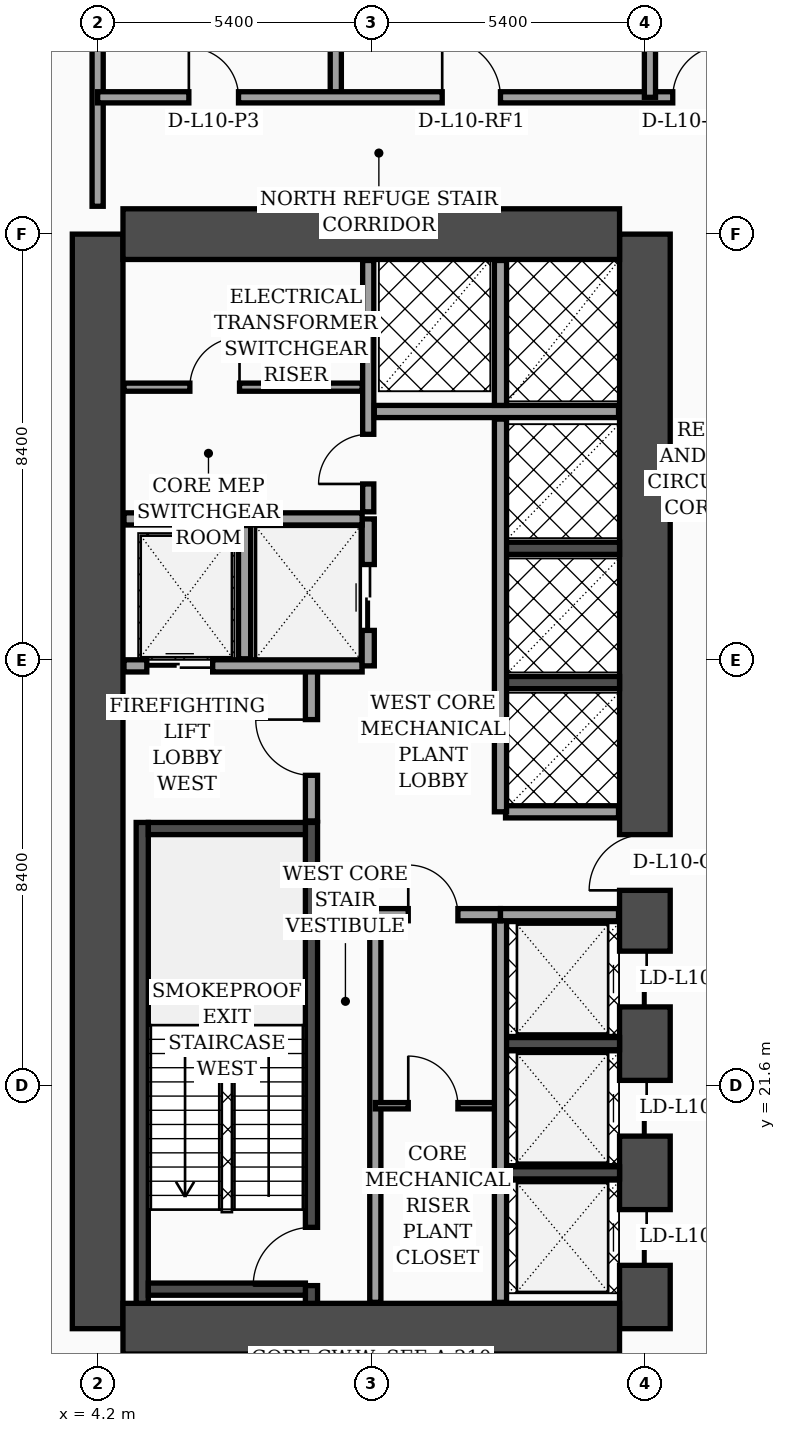
"""IFC4 building model, lengths in metres.
Left out: names, types, materials, properties, quantities, classifications, styles, units other than length and angle.
Written with IfcOpenShell. Run it as: python <this file> out.ifc"""

import sys

from ifc_helpers import new_model, si_unit, direction, frame, frame_2d, origin, place, context, subcontext, project, spatial, rectangle, extrude, element, fill, save


model = new_model("IFC4")
c1 = context("Model", 3, precision=1e-05, world=origin(), true_north=direction((0.0, 1.0)))
c2 = subcontext(c1, "Body", "Model", "MODEL_VIEW")
j1 = project(units=[si_unit("LENGTHUNIT", "METRE"), si_unit("PLANEANGLEUNIT", "RADIAN")], contexts=[c1])
p1 = place(None, origin())
s1 = spatial("IfcSite", under=j1, at=p1, CompositionType="ELEMENT")
p2 = place(p1, origin())
s2 = spatial("IfcBuilding", under=s1, at=p2, CompositionType="ELEMENT")
p3 = place(p2, frame((0.0, 0.0, 46.0)))
s3 = spatial("IfcBuildingStorey", under=s2, at=p3, CompositionType="ELEMENT", Elevation=46.0)
p4 = place(p3, frame((4.2, 16.8, 0.0), z_axis=(0.0, 0.0, 1.0), x_axis=(0.0, 1.0, 0.0)))
e1 = element("IfcWall", 1, at=p4, inside=s3, PredefinedType="SHEAR", context=c2, shape_type="SweptSolid", body=[
    extrude(rectangle(XDim=21.6, YDim=1.0, at=frame_2d((10.8, 0.0))), origin(), (0.0, 0.0, 1.0), 4.56),
])
p5 = place(p3, frame((15.0, 16.8, 0.0), z_axis=(0.0, 0.0, 1.0), x_axis=(0.0, 1.0, 0.0)))
e2 = element("IfcWall", 2, at=p5, inside=s3, PredefinedType="SHEAR", context=c2, shape_type="SweptSolid", body=[
    extrude(rectangle(XDim=21.6, YDim=1.0, at=frame_2d((10.8, 0.0))), origin(), (0.0, 0.0, 1.0), 4.56),
])
p6 = place(p5, frame((8.65, 0.0, 0.0)))
e3 = element("IfcOpeningElement", 3, at=p6, cuts=e2, PredefinedType="OPENING", context=c2, shape_type="SweptSolid", body=[
    extrude(rectangle(XDim=1.1, YDim=2.2, at=frame_2d((0.55, 1.1))), frame((0.0, 0.51, 0.0), z_axis=(0.0, -1.0, 0.0), x_axis=(1.0, 0.0, 0.0)), (0.0, 0.0, 1.0), 1.02),
])
p7 = place(p5, frame((1.25, 0.0, 0.0)))
e4 = element("IfcOpeningElement", 4, at=p7, cuts=e2, PredefinedType="OPENING", context=c2, shape_type="SweptSolid", body=[
    extrude(rectangle(XDim=1.1, YDim=2.2, at=frame_2d((0.55, 1.1))), frame((0.0, 0.51, 0.0), z_axis=(0.0, -1.0, 0.0), x_axis=(1.0, 0.0, 0.0)), (0.0, 0.0, 1.0), 1.02),
])
p8 = place(p5, frame((3.8, 0.0, 0.0)))
e5 = element("IfcOpeningElement", 5, at=p8, cuts=e2, PredefinedType="OPENING", context=c2, shape_type="SweptSolid", body=[
    extrude(rectangle(XDim=1.1, YDim=2.2, at=frame_2d((0.55, 1.1))), frame((0.0, 0.51, 0.0), z_axis=(0.0, -1.0, 0.0), x_axis=(1.0, 0.0, 0.0)), (0.0, 0.0, 1.0), 1.02),
])
p9 = place(p5, frame((6.35, 0.0, 0.0)))
e6 = element("IfcOpeningElement", 6, at=p9, cuts=e2, PredefinedType="OPENING", context=c2, shape_type="SweptSolid", body=[
    extrude(rectangle(XDim=1.1, YDim=2.2, at=frame_2d((0.55, 1.1))), frame((0.0, 0.51, 0.0), z_axis=(0.0, -1.0, 0.0), x_axis=(1.0, 0.0, 0.0)), (0.0, 0.0, 1.0), 1.02),
])
for number, where, z_axis, x_axis in (
    (7, (4.7, 38.4, 0.0), (0.0, 0.0, 1.0), (1.0, 0.0, 0.0)),
    (8, (4.7, 16.8, 0.0), (0.0, 0.0, 1.0), (1.0, 0.0, 0.0)),
):
    element("IfcWall", number, at=place(p3, frame(where, z_axis=z_axis, x_axis=x_axis)), inside=s3, PredefinedType="SHEAR", context=c2, shape_type="SweptSolid", body=[
        extrude(rectangle(XDim=9.8, YDim=1.0, at=frame_2d((4.9, 0.0))), origin(), (0.0, 0.0, 1.0), 4.56),
    ])
p10 = place(p3, frame((5.08, 17.3, 0.0), z_axis=(0.0, 0.0, 1.0), x_axis=(0.0, 1.0, 0.0)))
e9 = element("IfcWall", 9, at=p10, inside=s3, PredefinedType="SOLIDWALL", context=c2, shape_type="SweptSolid", body=[
    extrude(rectangle(XDim=9.49, YDim=0.24, at=frame_2d((4.745, 0.0))), origin(), (0.0, 0.0, 1.0), 4.56),
])
p11 = place(p3, frame((8.42, 17.3, 0.0), z_axis=(0.0, 0.0, 1.0), x_axis=(0.0, 1.0, 0.0)))
e10 = element("IfcWall", 10, at=p11, inside=s3, PredefinedType="SOLIDWALL", context=c2, shape_type="SweptSolid", body=[
    extrude(rectangle(XDim=9.49, YDim=0.24, at=frame_2d((4.745, 0.0))), origin(), (0.0, 0.0, 1.0), 4.56),
])
p12 = place(p11, frame((0.35, 0.0, 0.0)))
e11 = element("IfcOpeningElement", 11, at=p12, cuts=e10, PredefinedType="OPENING", context=c2, shape_type="SweptSolid", body=[
    extrude(rectangle(XDim=1.15, YDim=2.2, at=frame_2d((0.575, 1.1))), frame((0.0, 0.13, 0.0), z_axis=(0.0, -1.0, 0.0), x_axis=(1.0, 0.0, 0.0)), (0.0, 0.0, 1.0), 0.26),
])
for number, where, z_axis, x_axis in (
    (12, (5.2, 17.58, 0.0), (0.0, 0.0, 1.0), (1.0, 0.0, 0.0)),
    (13, (5.2, 26.67, 0.0), (0.0, 0.0, 1.0), (1.0, 0.0, 0.0)),
):
    element("IfcWall", number, at=place(p3, frame(where, z_axis=z_axis, x_axis=x_axis)), inside=s3, PredefinedType="SOLIDWALL", context=c2, shape_type="SweptSolid", body=[
        extrude(rectangle(XDim=3.1, YDim=0.24, at=frame_2d((1.55, 0.0))), origin(), (0.0, 0.0, 1.0), 4.56),
    ])
for number, where, z_axis, x_axis in (
    (14, (12.18, 19.875, 0.0), (0.0, 0.0, 1.0), (1.0, 0.0, 0.0)),
    (15, (12.18, 22.425, 0.0), (0.0, 0.0, 1.0), (1.0, 0.0, 0.0)),
    (16, (12.18, 29.55, 0.0), (0.0, 0.0, 1.0), (1.0, 0.0, 0.0)),
    (17, (12.18, 32.2, 0.0), (0.0, 0.0, 1.0), (1.0, 0.0, 0.0)),
):
    element("IfcWall", number, at=place(p3, frame(where, z_axis=z_axis, x_axis=x_axis)), inside=s3, PredefinedType="SOLIDWALL", context=c2, shape_type="SweptSolid", body=[
        extrude(rectangle(XDim=2.32, YDim=0.24, at=frame_2d((1.16, 0.0))), origin(), (0.0, 0.0, 1.0), 4.56),
    ])
p13 = place(p3, frame((8.42, 26.82, 0.0), z_axis=(0.0, 0.0, 1.0), x_axis=(0.0, 1.0, 0.0)))
e18 = element("IfcWall", 18, at=p13, inside=s3, PredefinedType="SOLIDWALL", context=c2, shape_type="SweptSolid", body=[
    extrude(rectangle(XDim=3.0, YDim=0.24, at=frame_2d((1.5, 0.0))), origin(), (0.0, 0.0, 1.0), 4.56),
])
p14 = place(p13, frame((0.9, 0.0, 0.0)))
e19 = element("IfcOpeningElement", 19, at=p14, cuts=e18, PredefinedType="OPENING", context=c2, shape_type="SweptSolid", body=[
    extrude(rectangle(XDim=1.1, YDim=2.2, at=frame_2d((0.55, 1.1))), frame((0.0, 0.13, 0.0), z_axis=(0.0, -1.0, 0.0), x_axis=(1.0, 0.0, 0.0)), (0.0, 0.0, 1.0), 0.26),
])
p15 = place(p3, frame((4.72, 29.88, 0.0), z_axis=(0.0, 0.0, 1.0), x_axis=(1.0, 0.0, 0.0)))
e20 = element("IfcWall", 20, at=p15, inside=s3, PredefinedType="SOLIDWALL", context=c2, shape_type="SweptSolid", body=[
    extrude(rectangle(XDim=4.7, YDim=0.24, at=frame_2d((2.35, 0.0))), origin(), (0.0, 0.0, 1.0), 4.56),
])
p16 = place(p15, frame((0.45, 0.0, 0.0)))
e21 = element("IfcOpeningElement", 21, at=p16, cuts=e20, PredefinedType="OPENING", context=c2, shape_type="SweptSolid", body=[
    extrude(rectangle(XDim=1.3, YDim=2.35, at=frame_2d((0.65, 1.175))), frame((0.0, 0.13, 0.0), z_axis=(0.0, -1.0, 0.0), x_axis=(1.0, 0.0, 0.0)), (0.0, 0.0, 1.0), 0.26),
])
p17 = place(p3, frame((7.1, 30.02, 0.0), z_axis=(0.0, 0.0, 1.0), x_axis=(0.0, 1.0, 0.0)))
e22 = element("IfcWall", 22, at=p17, inside=s3, PredefinedType="SOLIDWALL", context=c2, shape_type="SweptSolid", body=[
    extrude(rectangle(XDim=2.63, YDim=0.24, at=frame_2d((1.315, 0.0))), origin(), (0.0, 0.0, 1.0), 4.56),
])
p18 = place(p3, frame((9.54, 29.88, 0.0), z_axis=(0.0, 0.0, 1.0), x_axis=(0.0, 1.0, 0.0)))
e23 = element("IfcWall", 23, at=p18, inside=s3, PredefinedType="SOLIDWALL", context=c2, shape_type="SweptSolid", body=[
    extrude(rectangle(XDim=2.9, YDim=0.24, at=frame_2d((1.45, 0.0))), origin(), (0.0, 0.0, 1.0), 4.56),
])
p19 = place(p18, frame((0.7, 0.0, 0.0)))
e24 = element("IfcOpeningElement", 24, at=p19, cuts=e23, PredefinedType="OPENING", context=c2, shape_type="SweptSolid", body=[
    extrude(rectangle(XDim=1.3, YDim=2.35, at=frame_2d((0.65, 1.175))), frame((0.0, 0.13, 0.0), z_axis=(0.0, -1.0, 0.0), x_axis=(1.0, 0.0, 0.0)), (0.0, 0.0, 1.0), 0.26),
])
p20 = place(p3, frame((4.72, 32.78, 0.0), z_axis=(0.0, 0.0, 1.0), x_axis=(1.0, 0.0, 0.0)))
e25 = element("IfcWall", 25, at=p20, inside=s3, PredefinedType="SOLIDWALL", context=c2, shape_type="SweptSolid", body=[
    extrude(rectangle(XDim=4.7, YDim=0.24, at=frame_2d((2.35, 0.0))), origin(), (0.0, 0.0, 1.0), 4.56),
])
p21 = place(p3, frame((9.68, 17.32, 0.0), z_axis=(0.0, 0.0, 1.0), x_axis=(0.0, 1.0, 0.0)))
e26 = element("IfcWall", 26, at=p21, inside=s3, PredefinedType="SOLIDWALL", context=c2, shape_type="SweptSolid", body=[
    extrude(rectangle(XDim=7.68, YDim=0.22, at=frame_2d((3.84, 0.0))), origin(), (0.0, 0.0, 1.0), 4.56),
])
p22 = place(p3, frame((4.72, 35.38, 0.0), z_axis=(0.0, 0.0, 1.0), x_axis=(1.0, 0.0, 0.0)))
e27 = element("IfcWall", 27, at=p22, inside=s3, PredefinedType="PARTITIONING", context=c2, shape_type="SweptSolid", body=[
    extrude(rectangle(XDim=4.7, YDim=0.16, at=frame_2d((2.35, 0.0))), origin(), (0.0, 0.0, 1.0), 4.56),
])
p23 = place(p22, frame((1.3, 0.0, 0.0)))
e28 = element("IfcOpeningElement", 28, at=p23, cuts=e27, PredefinedType="OPENING", context=c2, shape_type="SweptSolid", body=[
    extrude(rectangle(XDim=0.98, YDim=2.15, at=frame_2d((0.49, 1.075))), frame((0.0, 0.09, 0.0), z_axis=(0.0, -1.0, 0.0), x_axis=(1.0, 0.0, 0.0)), (0.0, 0.0, 1.0), 0.18),
])
p24 = place(p3, frame((9.54, 32.92, 0.0), z_axis=(0.0, 0.0, 1.0), x_axis=(0.0, 1.0, 0.0)))
e29 = element("IfcWall", 29, at=p24, inside=s3, PredefinedType="SOLIDWALL", context=c2, shape_type="SweptSolid", body=[
    extrude(rectangle(XDim=4.96, YDim=0.22, at=frame_2d((2.48, 0.0))), origin(), (0.0, 0.0, 1.0), 4.56),
])
p25 = place(p24, frame((0.55, 0.0, 0.0)))
e30 = element("IfcOpeningElement", 30, at=p25, cuts=e29, PredefinedType="OPENING", context=c2, shape_type="SweptSolid", body=[
    extrude(rectangle(XDim=0.98, YDim=2.15, at=frame_2d((0.49, 1.075))), frame((0.0, 0.12, 0.0), z_axis=(0.0, -1.0, 0.0), x_axis=(1.0, 0.0, 0.0)), (0.0, 0.0, 1.0), 0.24),
])
p26 = place(p3, frame((9.68, 21.2, 0.0), z_axis=(0.0, 0.0, 1.0), x_axis=(1.0, 0.0, 0.0)))
e31 = element("IfcWall", 31, at=p26, inside=s3, PredefinedType="PARTITIONING", context=c2, shape_type="SweptSolid", body=[
    extrude(rectangle(XDim=2.47, YDim=0.125, at=frame_2d((1.235, 0.0))), origin(), (0.0, 0.0, 1.0), 4.56),
])
p27 = place(p26, frame((0.65, 0.0, 0.0)))
e32 = element("IfcOpeningElement", 32, at=p27, cuts=e31, PredefinedType="OPENING", context=c2, shape_type="SweptSolid", body=[
    extrude(rectangle(XDim=0.98, YDim=2.15, at=frame_2d((0.49, 1.075))), frame((0.0, 0.073, 0.0), z_axis=(0.0, -1.0, 0.0), x_axis=(1.0, 0.0, 0.0)), (0.0, 0.0, 1.0), 0.145),
])
p28 = place(p3, frame((12.15, 17.32, 0.0), z_axis=(0.0, 0.0, 1.0), x_axis=(0.0, 1.0, 0.0)))
e33 = element("IfcWall", 33, at=p28, inside=s3, PredefinedType="SOLIDWALL", context=c2, shape_type="SweptSolid", body=[
    extrude(rectangle(XDim=7.65, YDim=0.24, at=frame_2d((3.825, 0.0))), origin(), (0.0, 0.0, 1.0), 4.56),
])
p29 = place(p3, frame((9.68, 24.97, 0.0), z_axis=(0.0, 0.0, 1.0), x_axis=(1.0, 0.0, 0.0)))
e34 = element("IfcWall", 34, at=p29, inside=s3, PredefinedType="SOLIDWALL", context=c2, shape_type="SweptSolid", body=[
    extrude(rectangle(XDim=2.47, YDim=0.24, at=frame_2d((1.235, 0.0))), origin(), (0.0, 0.0, 1.0), 4.56),
])
p30 = place(p29, frame((0.65, 0.0, 0.0)))
e35 = element("IfcOpeningElement", 35, at=p30, cuts=e34, PredefinedType="OPENING", context=c2, shape_type="SweptSolid", body=[
    extrude(rectangle(XDim=0.98, YDim=2.15, at=frame_2d((0.49, 1.075))), frame((0.0, 0.13, 0.0), z_axis=(0.0, -1.0, 0.0), x_axis=(1.0, 0.0, 0.0)), (0.0, 0.0, 1.0), 0.26),
])
p31 = place(p3, frame((12.15, 24.97, 0.0), z_axis=(0.0, 0.0, 1.0), x_axis=(1.0, 0.0, 0.0)))
e36 = element("IfcWall", 36, at=p31, inside=s3, PredefinedType="SOLIDWALL", context=c2, shape_type="SweptSolid", body=[
    extrude(rectangle(XDim=2.33, YDim=0.24, at=frame_2d((1.165, 0.0))), origin(), (0.0, 0.0, 1.0), 3.84),
])
p32 = place(p3, frame((12.25, 27.0, 0.0), z_axis=(0.0, 0.0, 1.0), x_axis=(1.0, 0.0, 0.0)))
e37 = element("IfcWall", 37, at=p32, inside=s3, PredefinedType="SOLIDWALL", context=c2, shape_type="SweptSolid", body=[
    extrude(rectangle(XDim=2.23, YDim=0.24, at=frame_2d((1.115, 0.0))), origin(), (0.0, 0.0, 1.0), 4.56),
])
p33 = place(p3, frame((12.15, 27.0, 0.0), z_axis=(0.0, 0.0, 1.0), x_axis=(0.0, 1.0, 0.0)))
e38 = element("IfcWall", 38, at=p33, inside=s3, PredefinedType="SOLIDWALL", context=c2, shape_type="SweptSolid", body=[
    extrude(rectangle(XDim=7.75, YDim=0.24, at=frame_2d((3.875, 0.0))), origin(), (0.0, 0.0, 1.0), 4.56),
])
p34 = place(p3, frame((9.66, 34.9, 0.0), z_axis=(0.0, 0.0, 1.0), x_axis=(1.0, 0.0, 0.0)))
e39 = element("IfcWall", 39, at=p34, inside=s3, PredefinedType="SOLIDWALL", context=c2, shape_type="SweptSolid", body=[
    extrude(rectangle(XDim=4.82, YDim=0.24, at=frame_2d((2.41, 0.0))), origin(), (0.0, 0.0, 1.0), 4.56),
])
p35 = place(p3, frame((12.15, 35.02, 0.0), z_axis=(0.0, 0.0, 1.0), x_axis=(0.0, 1.0, 0.0)))
e40 = element("IfcWall", 40, at=p35, inside=s3, PredefinedType="SOLIDWALL", context=c2, shape_type="SweptSolid", body=[
    extrude(rectangle(XDim=2.86, YDim=0.24, at=frame_2d((1.43, 0.0))), origin(), (0.0, 0.0, 1.0), 4.56),
])
p36 = place(p3, frame((4.2, 38.95, 0.0), z_axis=(0.0, 0.0, 1.0), x_axis=(0.0, 1.0, 0.0)))
e41 = element("IfcWall", 41, at=p36, inside=s3, PredefinedType="SOLIDWALL", context=c2, shape_type="SweptSolid", body=[
    extrude(rectangle(XDim=11.99, YDim=0.22, at=frame_2d((5.995, 0.0))), origin(), (0.0, 0.0, 1.0), 3.84),
])
p37 = place(p3, frame((8.9, 41.1, 0.0), z_axis=(0.0, 0.0, 1.0), x_axis=(0.0, 1.0, 0.0)))
e42 = element("IfcWall", 42, at=p37, inside=s3, PredefinedType="SOLIDWALL", context=c2, shape_type="SweptSolid", body=[
    extrude(rectangle(XDim=9.84, YDim=0.22, at=frame_2d((4.92, 0.0))), origin(), (0.0, 0.0, 1.0), 4.04),
])
p38 = place(p3, frame((4.2, 41.1, 0.0), z_axis=(0.0, 0.0, 1.0), x_axis=(1.0, 0.0, 0.0)))
e43 = element("IfcWall", 43, at=p38, inside=s3, PredefinedType="SOLIDWALL", context=c2, shape_type="SweptSolid", body=[
    extrude(rectangle(XDim=13.65, YDim=0.22, at=frame_2d((6.825, 0.0))), origin(), (0.0, 0.0, 1.0), 3.84),
])
p39 = place(p38, frame((1.8, 0.0, 0.0)))
e44 = element("IfcOpeningElement", 44, at=p39, cuts=e43, PredefinedType="OPENING", context=c2, shape_type="SweptSolid", body=[
    extrude(rectangle(XDim=0.98, YDim=2.15, at=frame_2d((0.49, 1.075))), frame((0.0, 0.12, 0.0), z_axis=(0.0, -1.0, 0.0), x_axis=(1.0, 0.0, 0.0)), (0.0, 0.0, 1.0), 0.24),
])
p40 = place(p38, frame((6.8, 0.0, 0.0)))
e45 = element("IfcOpeningElement", 45, at=p40, cuts=e43, PredefinedType="OPENING", context=c2, shape_type="SweptSolid", body=[
    extrude(rectangle(XDim=1.15, YDim=2.2, at=frame_2d((0.575, 1.1))), frame((0.0, 0.12, 0.0), z_axis=(0.0, -1.0, 0.0), x_axis=(1.0, 0.0, 0.0)), (0.0, 0.0, 1.0), 0.24),
])
p41 = place(p38, frame((11.35, 0.0, 0.0)))
e46 = element("IfcOpeningElement", 46, at=p41, cuts=e43, PredefinedType="OPENING", context=c2, shape_type="SweptSolid", body=[
    extrude(rectangle(XDim=1.02, YDim=2.2, at=frame_2d((0.51, 1.1))), frame((0.0, 0.12, 0.0), z_axis=(0.0, -1.0, 0.0), x_axis=(1.0, 0.0, 0.0)), (0.0, 0.0, 1.0), 0.24),
])
p42 = place(p3, frame((15.1, 41.1, 0.0), z_axis=(0.0, 0.0, 1.0), x_axis=(0.0, 1.0, 0.0)))
e47 = element("IfcWall", 47, at=p42, inside=s3, PredefinedType="SOLIDWALL", context=c2, shape_type="SweptSolid", body=[
    extrude(rectangle(XDim=6.7, YDim=0.22, at=frame_2d((3.35, 0.0))), origin(), (0.0, 0.0, 1.0), 3.84),
])
p43 = place(p14, origin())
e48 = element("IfcDoor", 48, at=p43, inside=s3, OperationType="SINGLE_SWING_RIGHT", PredefinedType="DOOR", context=c2, shape_type="SweptSolid", body=[
    extrude(rectangle(XDim=1.1, YDim=2.2, at=frame_2d((0.55, 1.1))), frame((0.0, 0.025, 0.0), z_axis=(0.0, -1.0, 0.0), x_axis=(1.0, 0.0, 0.0)), (0.0, 0.0, 1.0), 0.05),
])
fill(e19, e48)
p44 = place(p16, origin())
e49 = element("IfcDoor", 49, at=p44, inside=s3, OperationType="DOUBLE_DOOR_SLIDING", PredefinedType="DOOR", context=c2, shape_type="SweptSolid", body=[
    extrude(rectangle(XDim=1.3, YDim=2.35, at=frame_2d((0.65, 1.175))), frame((0.0, 0.025, 0.0), z_axis=(0.0, -1.0, 0.0), x_axis=(1.0, 0.0, 0.0)), (0.0, 0.0, 1.0), 0.05),
])
fill(e21, e49)
p45 = place(p19, origin())
e50 = element("IfcDoor", 50, at=p45, inside=s3, OperationType="DOUBLE_DOOR_SLIDING", PredefinedType="DOOR", context=c2, shape_type="SweptSolid", body=[
    extrude(rectangle(XDim=1.3, YDim=2.35, at=frame_2d((0.65, 1.175))), frame((0.0, 0.025, 0.0), z_axis=(0.0, -1.0, 0.0), x_axis=(1.0, 0.0, 0.0)), (0.0, 0.0, 1.0), 0.05),
])
fill(e24, e50)
p46 = place(p23, origin())
e51 = element("IfcDoor", 51, at=p46, inside=s3, OperationType="SINGLE_SWING_RIGHT", PredefinedType="DOOR", context=c2, shape_type="SweptSolid", body=[
    extrude(rectangle(XDim=0.98, YDim=2.15, at=frame_2d((0.49, 1.075))), frame((0.0, 0.025, 0.0), z_axis=(0.0, -1.0, 0.0), x_axis=(1.0, 0.0, 0.0)), (0.0, 0.0, 1.0), 0.05),
])
fill(e28, e51)
p47 = place(p25, origin())
e52 = element("IfcDoor", 52, at=p47, inside=s3, OperationType="SINGLE_SWING_LEFT", PredefinedType="DOOR", context=c2, shape_type="SweptSolid", body=[
    extrude(rectangle(XDim=0.98, YDim=2.15, at=frame_2d((0.49, 1.075))), frame((0.0, 0.025, 0.0), z_axis=(0.0, -1.0, 0.0), x_axis=(1.0, 0.0, 0.0)), (0.0, 0.0, 1.0), 0.05),
])
fill(e30, e52)
p48 = place(p27, origin())
e53 = element("IfcDoor", 53, at=p48, inside=s3, OperationType="SINGLE_SWING_LEFT", PredefinedType="DOOR", context=c2, shape_type="SweptSolid", body=[
    extrude(rectangle(XDim=0.98, YDim=2.15, at=frame_2d((0.49, 1.075))), frame((0.0, 0.025, 0.0), z_axis=(0.0, -1.0, 0.0), x_axis=(1.0, 0.0, 0.0)), (0.0, 0.0, 1.0), 0.05),
])
fill(e32, e53)
p49 = place(p30, origin())
e54 = element("IfcDoor", 54, at=p49, inside=s3, OperationType="SINGLE_SWING_LEFT", PredefinedType="DOOR", context=c2, shape_type="SweptSolid", body=[
    extrude(rectangle(XDim=0.98, YDim=2.15, at=frame_2d((0.49, 1.075))), frame((0.0, 0.025, 0.0), z_axis=(0.0, -1.0, 0.0), x_axis=(1.0, 0.0, 0.0)), (0.0, 0.0, 1.0), 0.05),
])
fill(e35, e54)
p50 = place(p39, origin())
e55 = element("IfcDoor", 55, at=p50, inside=s3, OperationType="SINGLE_SWING_LEFT", PredefinedType="DOOR", context=c2, shape_type="SweptSolid", body=[
    extrude(rectangle(XDim=0.98, YDim=2.15, at=frame_2d((0.49, 1.075))), frame((0.0, 0.025, 0.0), z_axis=(0.0, -1.0, 0.0), x_axis=(1.0, 0.0, 0.0)), (0.0, 0.0, 1.0), 0.05),
])
fill(e44, e55)
p51 = place(p40, origin())
e56 = element("IfcDoor", 56, at=p51, inside=s3, OperationType="SINGLE_SWING_LEFT", PredefinedType="DOOR", context=c2, shape_type="SweptSolid", body=[
    extrude(rectangle(XDim=1.15, YDim=2.2, at=frame_2d((0.575, 1.1))), frame((0.0, 0.025, 0.0), z_axis=(0.0, -1.0, 0.0), x_axis=(1.0, 0.0, 0.0)), (0.0, 0.0, 1.0), 0.05),
])
fill(e45, e56)
p52 = place(p41, origin())
e57 = element("IfcDoor", 57, at=p52, inside=s3, OperationType="SINGLE_SWING_RIGHT", PredefinedType="DOOR", context=c2, shape_type="SweptSolid", body=[
    extrude(rectangle(XDim=1.02, YDim=2.2, at=frame_2d((0.51, 1.1))), frame((0.0, 0.025, 0.0), z_axis=(0.0, -1.0, 0.0), x_axis=(1.0, 0.0, 0.0)), (0.0, 0.0, 1.0), 0.05),
])
fill(e46, e57)
p53 = place(p12, origin())
e58 = element("IfcDoor", 58, at=p53, inside=s3, OperationType="SINGLE_SWING_LEFT", PredefinedType="DOOR", context=c2, shape_type="SweptSolid", body=[
    extrude(rectangle(XDim=1.15, YDim=2.2, at=frame_2d((0.575, 1.1))), frame((0.0, 0.025, 0.0), z_axis=(0.0, -1.0, 0.0), x_axis=(1.0, 0.0, 0.0)), (0.0, 0.0, 1.0), 0.05),
])
fill(e11, e58)
p54 = place(p6, origin())
e59 = element("IfcDoor", 59, at=p54, inside=s3, OperationType="SINGLE_SWING_LEFT", PredefinedType="DOOR", context=c2, shape_type="SweptSolid", body=[
    extrude(rectangle(XDim=1.1, YDim=2.2, at=frame_2d((0.55, 1.1))), frame((0.0, 0.025, 0.0), z_axis=(0.0, -1.0, 0.0), x_axis=(1.0, 0.0, 0.0)), (0.0, 0.0, 1.0), 0.05),
])
fill(e3, e59)
p55 = place(p7, origin())
e60 = element("IfcDoor", 60, at=p55, inside=s3, OperationType="DOUBLE_DOOR_SLIDING", PredefinedType="DOOR", context=c2, shape_type="SweptSolid", body=[
    extrude(rectangle(XDim=1.1, YDim=2.2, at=frame_2d((0.55, 1.1))), frame((0.0, 0.025, 0.0), z_axis=(0.0, -1.0, 0.0), x_axis=(1.0, 0.0, 0.0)), (0.0, 0.0, 1.0), 0.05),
])
fill(e4, e60)
p56 = place(p8, origin())
e61 = element("IfcDoor", 61, at=p56, inside=s3, OperationType="DOUBLE_DOOR_SLIDING", PredefinedType="DOOR", context=c2, shape_type="SweptSolid", body=[
    extrude(rectangle(XDim=1.1, YDim=2.2, at=frame_2d((0.55, 1.1))), frame((0.0, 0.025, 0.0), z_axis=(0.0, -1.0, 0.0), x_axis=(1.0, 0.0, 0.0)), (0.0, 0.0, 1.0), 0.05),
])
fill(e5, e61)
p57 = place(p9, origin())
e62 = element("IfcDoor", 62, at=p57, inside=s3, OperationType="DOUBLE_DOOR_SLIDING", PredefinedType="DOOR", context=c2, shape_type="SweptSolid", body=[
    extrude(rectangle(XDim=1.1, YDim=2.2, at=frame_2d((0.55, 1.1))), frame((0.0, 0.025, 0.0), z_axis=(0.0, -1.0, 0.0), x_axis=(1.0, 0.0, 0.0)), (0.0, 0.0, 1.0), 0.05),
])
fill(e6, e62)
save(model, sys.argv[1])
